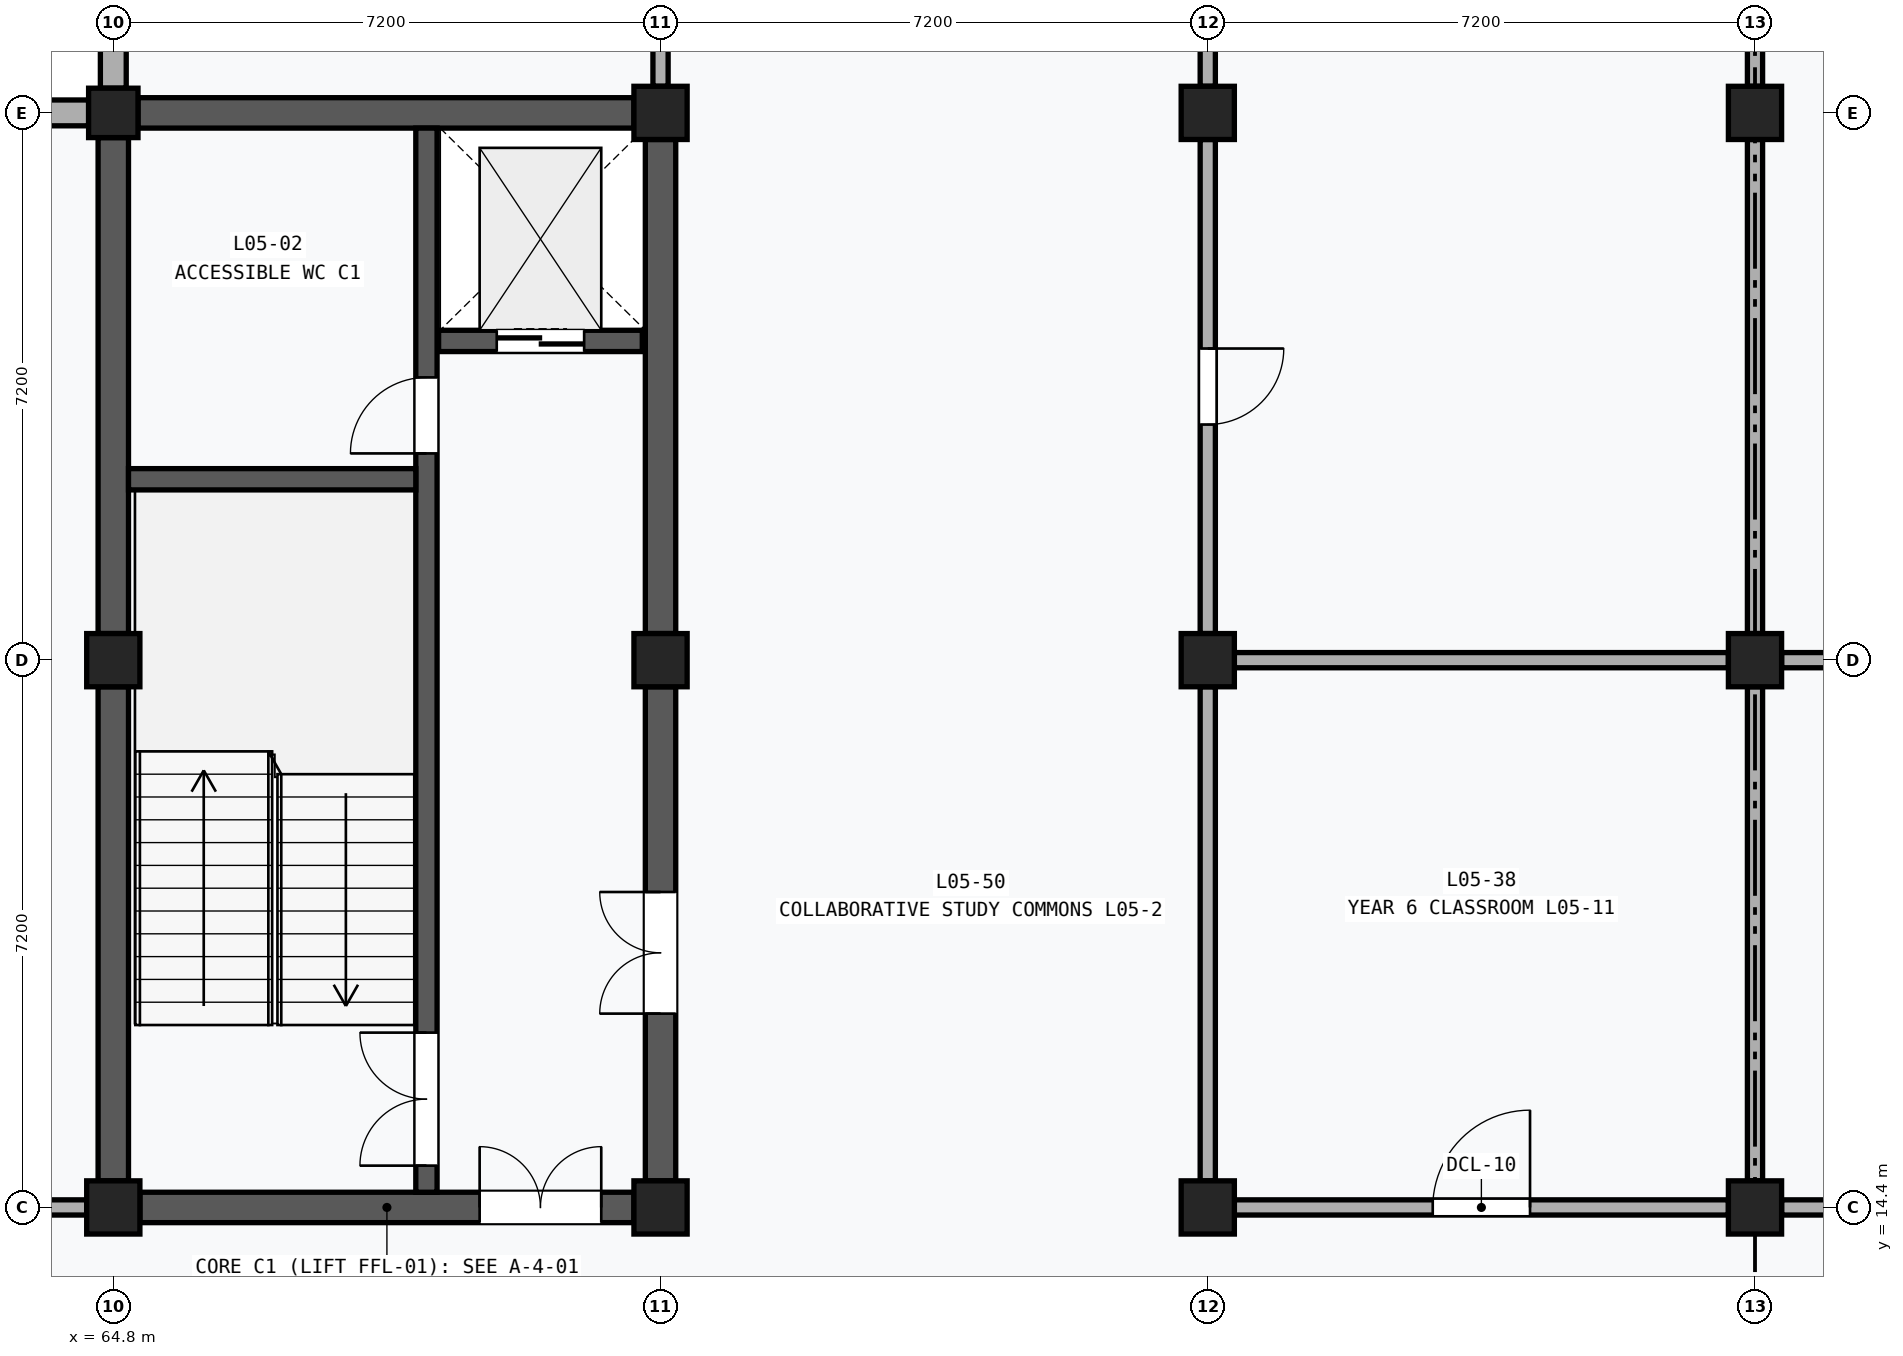
"""IFC4 building model, lengths in metres.
Left out: names, types, materials, properties, quantities, classifications, styles, units other than length and angle.
Written with IfcOpenShell. Run it as: python <this file> out.ifc"""

import sys

from ifc_helpers import new_model, si_unit, direction, frame, frame_2d, origin, origin_2d, place, context, subcontext, project, spatial, rectangle, extrude, element, fill, save


model = new_model("IFC4")
c1 = context("Model", 3, precision=1e-05, world=origin(), true_north=direction((0.0, 1.0)))
c2 = subcontext(c1, "Body", "Model", "MODEL_VIEW")
j1 = project(units=[si_unit("LENGTHUNIT", "METRE"), si_unit("PLANEANGLEUNIT", "RADIAN")], contexts=[c1])
p1 = place(None, origin())
s1 = spatial("IfcSite", under=j1, at=p1, CompositionType="ELEMENT")
p2 = place(p1, origin())
s2 = spatial("IfcBuilding", under=s1, at=p2, CompositionType="ELEMENT")
p3 = place(p2, frame((0.0, 0.0, 22.6)))
s3 = spatial("IfcBuildingStorey", under=s2, at=p3, CompositionType="ELEMENT", Elevation=22.6)
for number, where, z_axis, x_axis in (
    (1, (64.8, 14.4, 0.0), (0.0, 0.0, 1.0), (1.0, 0.0, 0.0)),
    (2, (64.8, 21.6, 0.0), (0.0, 0.0, 1.0), (1.0, 0.0, 0.0)),
):
    element("IfcColumn", number, at=place(p3, frame(where, z_axis=z_axis, x_axis=x_axis)), inside=s3, PredefinedType="COLUMN", context=c2, shape_type="SweptSolid", body=[
        extrude(rectangle(XDim=0.7, YDim=0.7, at=origin_2d()), origin(), (0.0, 0.0, 1.0), 4.0),
    ])
p4 = place(p3, frame((64.8, 28.8, 0.0), z_axis=(0.0, 0.0, 1.0), x_axis=(1.0, 0.0, 0.0)))
e3 = element("IfcColumn", 3, at=p4, inside=s3, PredefinedType="COLUMN", context=c2, shape_type="SweptSolid", body=[
    extrude(rectangle(XDim=0.65, YDim=0.65, at=origin_2d()), origin(), (0.0, 0.0, 1.0), 4.0),
])
for number, where, z_axis, x_axis in (
    (4, (72.0, 14.4, 0.0), (0.0, 0.0, 1.0), (1.0, 0.0, 0.0)),
    (5, (72.0, 21.6, 0.0), (0.0, 0.0, 1.0), (1.0, 0.0, 0.0)),
    (6, (72.0, 28.8, 0.0), (0.0, 0.0, 1.0), (1.0, 0.0, 0.0)),
    (7, (79.2, 14.4, 0.0), (0.0, 0.0, 1.0), (1.0, 0.0, 0.0)),
    (8, (79.2, 21.6, 0.0), (0.0, 0.0, 1.0), (1.0, 0.0, 0.0)),
    (9, (79.2, 28.8, 0.0), (0.0, 0.0, 1.0), (1.0, 0.0, 0.0)),
    (10, (86.4, 14.4, 0.0), (0.0, 0.0, 1.0), (1.0, 0.0, 0.0)),
    (11, (86.4, 21.6, 0.0), (0.0, 0.0, 1.0), (1.0, 0.0, 0.0)),
    (12, (86.4, 28.8, 0.0), (0.0, 0.0, 1.0), (1.0, 0.0, 0.0)),
):
    element("IfcColumn", number, at=place(p3, frame(where, z_axis=z_axis, x_axis=x_axis)), inside=s3, PredefinedType="COLUMN", context=c2, shape_type="SweptSolid", body=[
        extrude(rectangle(XDim=0.7, YDim=0.7, at=origin_2d()), origin(), (0.0, 0.0, 1.0), 4.0),
    ])
p5 = place(p3, frame((57.925, 28.8, 0.0), z_axis=(0.0, 0.0, 1.0), x_axis=(1.0, 0.0, 0.0)))
e13 = element("IfcWall", 13, at=p5, inside=s3, PredefinedType="SOLIDWALL", context=c2, shape_type="SweptSolid", body=[
    extrude(rectangle(XDim=6.55, YDim=0.34, at=frame_2d((3.275, 0.0))), origin(), (0.0, 0.0, 1.0), 3.12),
])
p6 = place(p5, frame((1.975, 0.0, 0.9)))
e14 = element("IfcOpeningElement", 14, at=p6, cuts=e13, PredefinedType="OPENING", context=c2, shape_type="SweptSolid", body=[
    extrude(rectangle(XDim=2.6, YDim=1.8, at=frame_2d((1.3, 0.9))), frame((0.0, 0.182, 0.0), z_axis=(0.0, -1.0, 0.0), x_axis=(1.0, 0.0, 0.0)), (0.0, 0.0, 1.0), 0.364),
])
p7 = place(p3, frame((64.8, 29.125, 0.0), z_axis=(0.0, 0.0, 1.0), x_axis=(0.0, 1.0, 0.0)))
e15 = element("IfcWall", 15, at=p7, inside=s3, PredefinedType="SOLIDWALL", context=c2, shape_type="SweptSolid", body=[
    extrude(rectangle(XDim=6.55, YDim=0.34, at=frame_2d((3.275, 0.0))), origin(), (0.0, 0.0, 1.0), 3.12),
])
p8 = place(p7, frame((1.875, 0.0, 0.9)))
e16 = element("IfcOpeningElement", 16, at=p8, cuts=e15, PredefinedType="OPENING", context=c2, shape_type="SweptSolid", body=[
    extrude(rectangle(XDim=2.8, YDim=1.8, at=frame_2d((1.4, 0.9))), frame((0.0, 0.182, 0.0), z_axis=(0.0, -1.0, 0.0), x_axis=(1.0, 0.0, 0.0)), (0.0, 0.0, 1.0), 0.364),
])
p9 = place(p3, frame((64.8, 14.75, 0.0), z_axis=(0.0, 0.0, 1.0), x_axis=(0.0, 1.0, 0.0)))
e17 = element("IfcWall", 17, at=p9, inside=s3, PredefinedType="SHEAR", context=c2, shape_type="SweptSolid", body=[
    extrude(rectangle(XDim=6.5, YDim=0.4, at=frame_2d((3.25, 0.0))), origin(), (0.0, 0.0, 1.0), 2.98),
])
p10 = place(p3, frame((64.8, 21.95, 0.0), z_axis=(0.0, 0.0, 1.0), x_axis=(0.0, 1.0, 0.0)))
e18 = element("IfcWall", 18, at=p10, inside=s3, PredefinedType="SHEAR", context=c2, shape_type="SweptSolid", body=[
    extrude(rectangle(XDim=6.525, YDim=0.4, at=frame_2d((3.263, 0.0))), origin(), (0.0, 0.0, 1.0), 2.98),
])
p11 = place(p3, frame((72.0, 14.75, 0.0), z_axis=(0.0, 0.0, 1.0), x_axis=(0.0, 1.0, 0.0)))
e19 = element("IfcWall", 19, at=p11, inside=s3, PredefinedType="SHEAR", context=c2, shape_type="SweptSolid", body=[
    extrude(rectangle(XDim=6.5, YDim=0.4, at=frame_2d((3.25, 0.0))), origin(), (0.0, 0.0, 1.0), 2.98),
])
p12 = place(p11, frame((2.2, 0.0, 0.0)))
e20 = element("IfcOpeningElement", 20, at=p12, cuts=e19, PredefinedType="OPENING", context=c2, shape_type="SweptSolid", body=[
    extrude(rectangle(XDim=1.6, YDim=2.2, at=frame_2d((0.8, 1.1))), frame((0.0, 0.212, 0.0), z_axis=(0.0, -1.0, 0.0), x_axis=(1.0, 0.0, 0.0)), (0.0, 0.0, 1.0), 0.424),
])
p13 = place(p3, frame((72.0, 21.95, 0.0), z_axis=(0.0, 0.0, 1.0), x_axis=(0.0, 1.0, 0.0)))
e21 = element("IfcWall", 21, at=p13, inside=s3, PredefinedType="SHEAR", context=c2, shape_type="SweptSolid", body=[
    extrude(rectangle(XDim=6.5, YDim=0.4, at=frame_2d((3.25, 0.0))), origin(), (0.0, 0.0, 1.0), 2.98),
])
p14 = place(p3, frame((65.15, 14.4, 0.0), z_axis=(0.0, 0.0, 1.0), x_axis=(1.0, 0.0, 0.0)))
e22 = element("IfcWall", 22, at=p14, inside=s3, PredefinedType="SHEAR", context=c2, shape_type="SweptSolid", body=[
    extrude(rectangle(XDim=6.5, YDim=0.4, at=frame_2d((3.25, 0.0))), origin(), (0.0, 0.0, 1.0), 2.98),
])
p15 = place(p14, frame((4.47, 0.0, 0.0)))
e23 = element("IfcOpeningElement", 23, at=p15, cuts=e22, PredefinedType="OPENING", context=c2, shape_type="SweptSolid", body=[
    extrude(rectangle(XDim=1.6, YDim=2.2, at=frame_2d((0.8, 1.1))), frame((0.0, 0.212, 0.0), z_axis=(0.0, -1.0, 0.0), x_axis=(1.0, 0.0, 0.0)), (0.0, 0.0, 1.0), 0.424),
])
p16 = place(p3, frame((65.125, 28.8, 0.0), z_axis=(0.0, 0.0, 1.0), x_axis=(1.0, 0.0, 0.0)))
e24 = element("IfcWall", 24, at=p16, inside=s3, PredefinedType="SHEAR", context=c2, shape_type="SweptSolid", body=[
    extrude(rectangle(XDim=6.525, YDim=0.4, at=frame_2d((3.262, 0.0))), origin(), (0.0, 0.0, 1.0), 2.98),
])
p17 = place(p3, frame((68.92, 14.6, 0.0), z_axis=(0.0, 0.0, 1.0), x_axis=(0.0, 1.0, 0.0)))
e25 = element("IfcWall", 25, at=p17, inside=s3, PredefinedType="SHEAR", context=c2, shape_type="SweptSolid", body=[
    extrude(rectangle(XDim=14.0, YDim=0.28, at=frame_2d((7.0, 0.0))), origin(), (0.0, 0.0, 1.0), 3.75),
])
p18 = place(p17, frame((0.35, 0.0, 0.0)))
e26 = element("IfcOpeningElement", 26, at=p18, cuts=e25, PredefinedType="OPENING", context=c2, shape_type="SweptSolid", body=[
    extrude(rectangle(XDim=1.75, YDim=2.15, at=frame_2d((0.875, 1.075))), frame((0.0, 0.152, 0.0), z_axis=(0.0, -1.0, 0.0), x_axis=(1.0, 0.0, 0.0)), (0.0, 0.0, 1.0), 0.304),
])
p19 = place(p17, frame((9.72, 0.0, 0.0)))
e27 = element("IfcOpeningElement", 27, at=p19, cuts=e25, PredefinedType="OPENING", context=c2, shape_type="SweptSolid", body=[
    extrude(rectangle(XDim=1.0, YDim=2.15, at=frame_2d((0.5, 1.075))), frame((0.0, 0.152, 0.0), z_axis=(0.0, -1.0, 0.0), x_axis=(1.0, 0.0, 0.0)), (0.0, 0.0, 1.0), 0.304),
])
p20 = place(p3, frame((65.0, 23.98, 0.0), z_axis=(0.0, 0.0, 1.0), x_axis=(1.0, 0.0, 0.0)))
e28 = element("IfcWall", 28, at=p20, inside=s3, PredefinedType="SHEAR", context=c2, shape_type="SweptSolid", body=[
    extrude(rectangle(XDim=3.78, YDim=0.28, at=frame_2d((1.89, 0.0))), origin(), (0.0, 0.0, 1.0), 3.75),
])
p21 = place(p3, frame((69.08, 25.8, 0.0), z_axis=(0.0, 0.0, 1.0), x_axis=(1.0, 0.0, 0.0)))
e29 = element("IfcWall", 29, at=p21, inside=s3, PredefinedType="SHEAR", context=c2, shape_type="SweptSolid", body=[
    extrude(rectangle(XDim=2.68, YDim=0.28, at=frame_2d((1.34, 0.0))), origin(), (0.0, 0.0, 1.0), 3.75),
])
p22 = place(p21, frame((0.765, 0.0, 0.0)))
e30 = element("IfcOpeningElement", 30, at=p22, cuts=e29, PredefinedType="OPENING", context=c2, shape_type="SweptSolid", body=[
    extrude(rectangle(XDim=1.15, YDim=2.2, at=frame_2d((0.575, 1.1))), frame((0.0, 0.152, 0.0), z_axis=(0.0, -1.0, 0.0), x_axis=(1.0, 0.0, 0.0)), (0.0, 0.0, 1.0), 0.304),
])
p23 = place(p3, frame((57.95, 14.4, 0.0), z_axis=(0.0, 0.0, 1.0), x_axis=(1.0, 0.0, 0.0)))
e31 = element("IfcWall", 31, at=p23, inside=s3, PredefinedType="PARTITIONING", context=c2, shape_type="SweptSolid", body=[
    extrude(rectangle(XDim=6.5, YDim=0.2, at=frame_2d((3.25, 0.0))), origin(), (0.0, 0.0, 1.0), 2.98),
])
p24 = place(p23, frame((2.75, 0.0, 0.0)))
e32 = element("IfcOpeningElement", 32, at=p24, cuts=e31, PredefinedType="OPENING", context=c2, shape_type="SweptSolid", body=[
    extrude(rectangle(XDim=1.0, YDim=2.1, at=frame_2d((0.5, 1.05))), frame((0.0, 0.112, 0.0), z_axis=(0.0, -1.0, 0.0), x_axis=(1.0, 0.0, 0.0)), (0.0, 0.0, 1.0), 0.224),
])
p25 = place(p3, frame((72.0, 29.15, 0.0), z_axis=(0.0, 0.0, 1.0), x_axis=(0.0, 1.0, 0.0)))
e33 = element("IfcWall", 33, at=p25, inside=s3, PredefinedType="PARTITIONING", context=c2, shape_type="SweptSolid", body=[
    extrude(rectangle(XDim=6.5, YDim=0.2, at=frame_2d((3.25, 0.0))), origin(), (0.0, 0.0, 1.0), 2.98),
])
p26 = place(p25, frame((2.67, 0.0, 0.0)))
e34 = element("IfcOpeningElement", 34, at=p26, cuts=e33, PredefinedType="OPENING", context=c2, shape_type="SweptSolid", body=[
    extrude(rectangle(XDim=1.16, YDim=2.22, at=frame_2d((0.58, 1.11))), frame((0.0, 0.112, 0.0), z_axis=(0.0, -1.0, 0.0), x_axis=(1.0, 0.0, 0.0)), (0.0, 0.0, 1.0), 0.224),
])
p27 = place(p3, frame((79.55, 14.4, 0.0), z_axis=(0.0, 0.0, 1.0), x_axis=(1.0, 0.0, 0.0)))
e35 = element("IfcWall", 35, at=p27, inside=s3, PredefinedType="PARTITIONING", context=c2, shape_type="SweptSolid", body=[
    extrude(rectangle(XDim=6.5, YDim=0.2, at=frame_2d((3.25, 0.0))), origin(), (0.0, 0.0, 1.0), 2.98),
])
p28 = place(p27, frame((2.61, 0.0, 0.0)))
e36 = element("IfcOpeningElement", 36, at=p28, cuts=e35, PredefinedType="OPENING", context=c2, shape_type="SweptSolid", body=[
    extrude(rectangle(XDim=1.28, YDim=2.28, at=frame_2d((0.64, 1.14))), frame((0.0, 0.112, 0.0), z_axis=(0.0, -1.0, 0.0), x_axis=(1.0, 0.0, 0.0)), (0.0, 0.0, 1.0), 0.224),
])
for number, where, z_axis, x_axis in (
    (37, (79.55, 21.6, 0.0), (0.0, 0.0, 1.0), (1.0, 0.0, 0.0)),
    (38, (79.2, 14.75, 0.0), (0.0, 0.0, 1.0), (0.0, 1.0, 0.0)),
    (39, (86.4, 14.75, 0.0), (0.0, 0.0, 1.0), (0.0, 1.0, 0.0)),
):
    element("IfcWall", number, at=place(p3, frame(where, z_axis=z_axis, x_axis=x_axis)), inside=s3, PredefinedType="PARTITIONING", context=c2, shape_type="SweptSolid", body=[
        extrude(rectangle(XDim=6.5, YDim=0.2, at=frame_2d((3.25, 0.0))), origin(), (0.0, 0.0, 1.0), 2.98),
    ])
p29 = place(p3, frame((79.2, 21.95, 0.0), z_axis=(0.0, 0.0, 1.0), x_axis=(0.0, 1.0, 0.0)))
e40 = element("IfcWall", 40, at=p29, inside=s3, PredefinedType="PARTITIONING", context=c2, shape_type="SweptSolid", body=[
    extrude(rectangle(XDim=6.5, YDim=0.2, at=frame_2d((3.25, 0.0))), origin(), (0.0, 0.0, 1.0), 2.98),
])
p30 = place(p29, frame((2.75, 0.0, 0.0)))
e41 = element("IfcOpeningElement", 41, at=p30, cuts=e40, PredefinedType="OPENING", context=c2, shape_type="SweptSolid", body=[
    extrude(rectangle(XDim=1.0, YDim=2.1, at=frame_2d((0.5, 1.05))), frame((0.0, 0.112, 0.0), z_axis=(0.0, -1.0, 0.0), x_axis=(1.0, 0.0, 0.0)), (0.0, 0.0, 1.0), 0.224),
])
for number, where, z_axis, x_axis in (
    (42, (86.4, 21.95, 0.0), (0.0, 0.0, 1.0), (0.0, 1.0, 0.0)),
    (43, (79.2, 29.15, 0.0), (0.0, 0.0, 1.0), (0.0, 1.0, 0.0)),
    (44, (86.4, 29.15, 0.0), (0.0, 0.0, 1.0), (0.0, 1.0, 0.0)),
):
    element("IfcWall", number, at=place(p3, frame(where, z_axis=z_axis, x_axis=x_axis)), inside=s3, PredefinedType="PARTITIONING", context=c2, shape_type="SweptSolid", body=[
        extrude(rectangle(XDim=6.5, YDim=0.2, at=frame_2d((3.25, 0.0))), origin(), (0.0, 0.0, 1.0), 2.98),
    ])
p31 = place(p3, frame((86.75, 14.4, 0.0), z_axis=(0.0, 0.0, 1.0), x_axis=(1.0, 0.0, 0.0)))
e45 = element("IfcWall", 45, at=p31, inside=s3, PredefinedType="PARTITIONING", context=c2, shape_type="SweptSolid", body=[
    extrude(rectangle(XDim=6.5, YDim=0.2, at=frame_2d((3.25, 0.0))), origin(), (0.0, 0.0, 1.0), 2.98),
])
p32 = place(p31, frame((2.72, 0.0, 0.0)))
e46 = element("IfcOpeningElement", 46, at=p32, cuts=e45, PredefinedType="OPENING", context=c2, shape_type="SweptSolid", body=[
    extrude(rectangle(XDim=1.06, YDim=2.16, at=frame_2d((0.53, 1.08))), frame((0.0, 0.112, 0.0), z_axis=(0.0, -1.0, 0.0), x_axis=(1.0, 0.0, 0.0)), (0.0, 0.0, 1.0), 0.224),
])
p33 = place(p3, frame((86.75, 21.6, 0.0), z_axis=(0.0, 0.0, 1.0), x_axis=(1.0, 0.0, 0.0)))
e47 = element("IfcWall", 47, at=p33, inside=s3, PredefinedType="PARTITIONING", context=c2, shape_type="SweptSolid", body=[
    extrude(rectangle(XDim=6.5, YDim=0.2, at=frame_2d((3.25, 0.0))), origin(), (0.0, 0.0, 1.0), 2.98),
])
p34 = place(p12, origin())
e48 = element("IfcDoor", 48, at=p34, inside=s3, OperationType="DOUBLE_DOOR_SINGLE_SWING", PredefinedType="DOOR", context=c2, shape_type="SweptSolid", body=[
    extrude(rectangle(XDim=1.6, YDim=2.2, at=frame_2d((0.8, 1.1))), frame((0.0, 0.025, 0.0), z_axis=(0.0, -1.0, 0.0), x_axis=(1.0, 0.0, 0.0)), (0.0, 0.0, 1.0), 0.05),
])
fill(e20, e48)
p35 = place(p15, origin())
e49 = element("IfcDoor", 49, at=p35, inside=s3, OperationType="DOUBLE_DOOR_SINGLE_SWING", PredefinedType="DOOR", context=c2, shape_type="SweptSolid", body=[
    extrude(rectangle(XDim=1.6, YDim=2.2, at=frame_2d((0.8, 1.1))), frame((0.0, 0.025, 0.0), z_axis=(0.0, -1.0, 0.0), x_axis=(1.0, 0.0, 0.0)), (0.0, 0.0, 1.0), 0.05),
])
fill(e23, e49)
p36 = place(p18, origin())
e50 = element("IfcDoor", 50, at=p36, inside=s3, OperationType="DOUBLE_DOOR_SINGLE_SWING", PredefinedType="DOOR", context=c2, shape_type="SweptSolid", body=[
    extrude(rectangle(XDim=1.75, YDim=2.15, at=frame_2d((0.875, 1.075))), frame((0.0, 0.025, 0.0), z_axis=(0.0, -1.0, 0.0), x_axis=(1.0, 0.0, 0.0)), (0.0, 0.0, 1.0), 0.05),
])
fill(e26, e50)
p37 = place(p19, origin())
e51 = element("IfcDoor", 51, at=p37, inside=s3, OperationType="SINGLE_SWING_LEFT", PredefinedType="DOOR", context=c2, shape_type="SweptSolid", body=[
    extrude(rectangle(XDim=1.0, YDim=2.15, at=frame_2d((0.5, 1.075))), frame((0.0, 0.025, 0.0), z_axis=(0.0, -1.0, 0.0), x_axis=(1.0, 0.0, 0.0)), (0.0, 0.0, 1.0), 0.05),
])
fill(e27, e51)
p38 = place(p22, frame((1.15, 0.0, 0.0), z_axis=(0.0, 0.0, 1.0), x_axis=(-1.0, 0.0, 0.0)))
e52 = element("IfcDoor", 52, at=p38, inside=s3, OperationType="DOUBLE_DOOR_SLIDING", PredefinedType="DOOR", context=c2, shape_type="SweptSolid", body=[
    extrude(rectangle(XDim=1.15, YDim=2.2, at=frame_2d((0.575, 1.1))), frame((0.0, 0.025, 0.0), z_axis=(0.0, -1.0, 0.0), x_axis=(1.0, 0.0, 0.0)), (0.0, 0.0, 1.0), 0.05),
])
fill(e30, e52)
p39 = place(p28, origin())
e53 = element("IfcDoor", 53, at=p39, inside=s3, OperationType="SINGLE_SWING_RIGHT", PredefinedType="DOOR", context=c2, shape_type="SweptSolid", body=[
    extrude(rectangle(XDim=1.28, YDim=2.28, at=frame_2d((0.64, 1.14))), frame((0.0, 0.025, 0.0), z_axis=(0.0, -1.0, 0.0), x_axis=(1.0, 0.0, 0.0)), (0.0, 0.0, 1.0), 0.05),
])
fill(e36, e53)
p40 = place(p30, frame((1.0, 0.0, 0.0), z_axis=(0.0, 0.0, 1.0), x_axis=(-1.0, 0.0, 0.0)))
e54 = element("IfcDoor", 54, at=p40, inside=s3, OperationType="SINGLE_SWING_LEFT", PredefinedType="DOOR", context=c2, shape_type="SweptSolid", body=[
    extrude(rectangle(XDim=1.0, YDim=2.1, at=frame_2d((0.5, 1.05))), frame((0.0, 0.025, 0.0), z_axis=(0.0, -1.0, 0.0), x_axis=(1.0, 0.0, 0.0)), (0.0, 0.0, 1.0), 0.05),
])
fill(e41, e54)
save(model, sys.argv[1])
